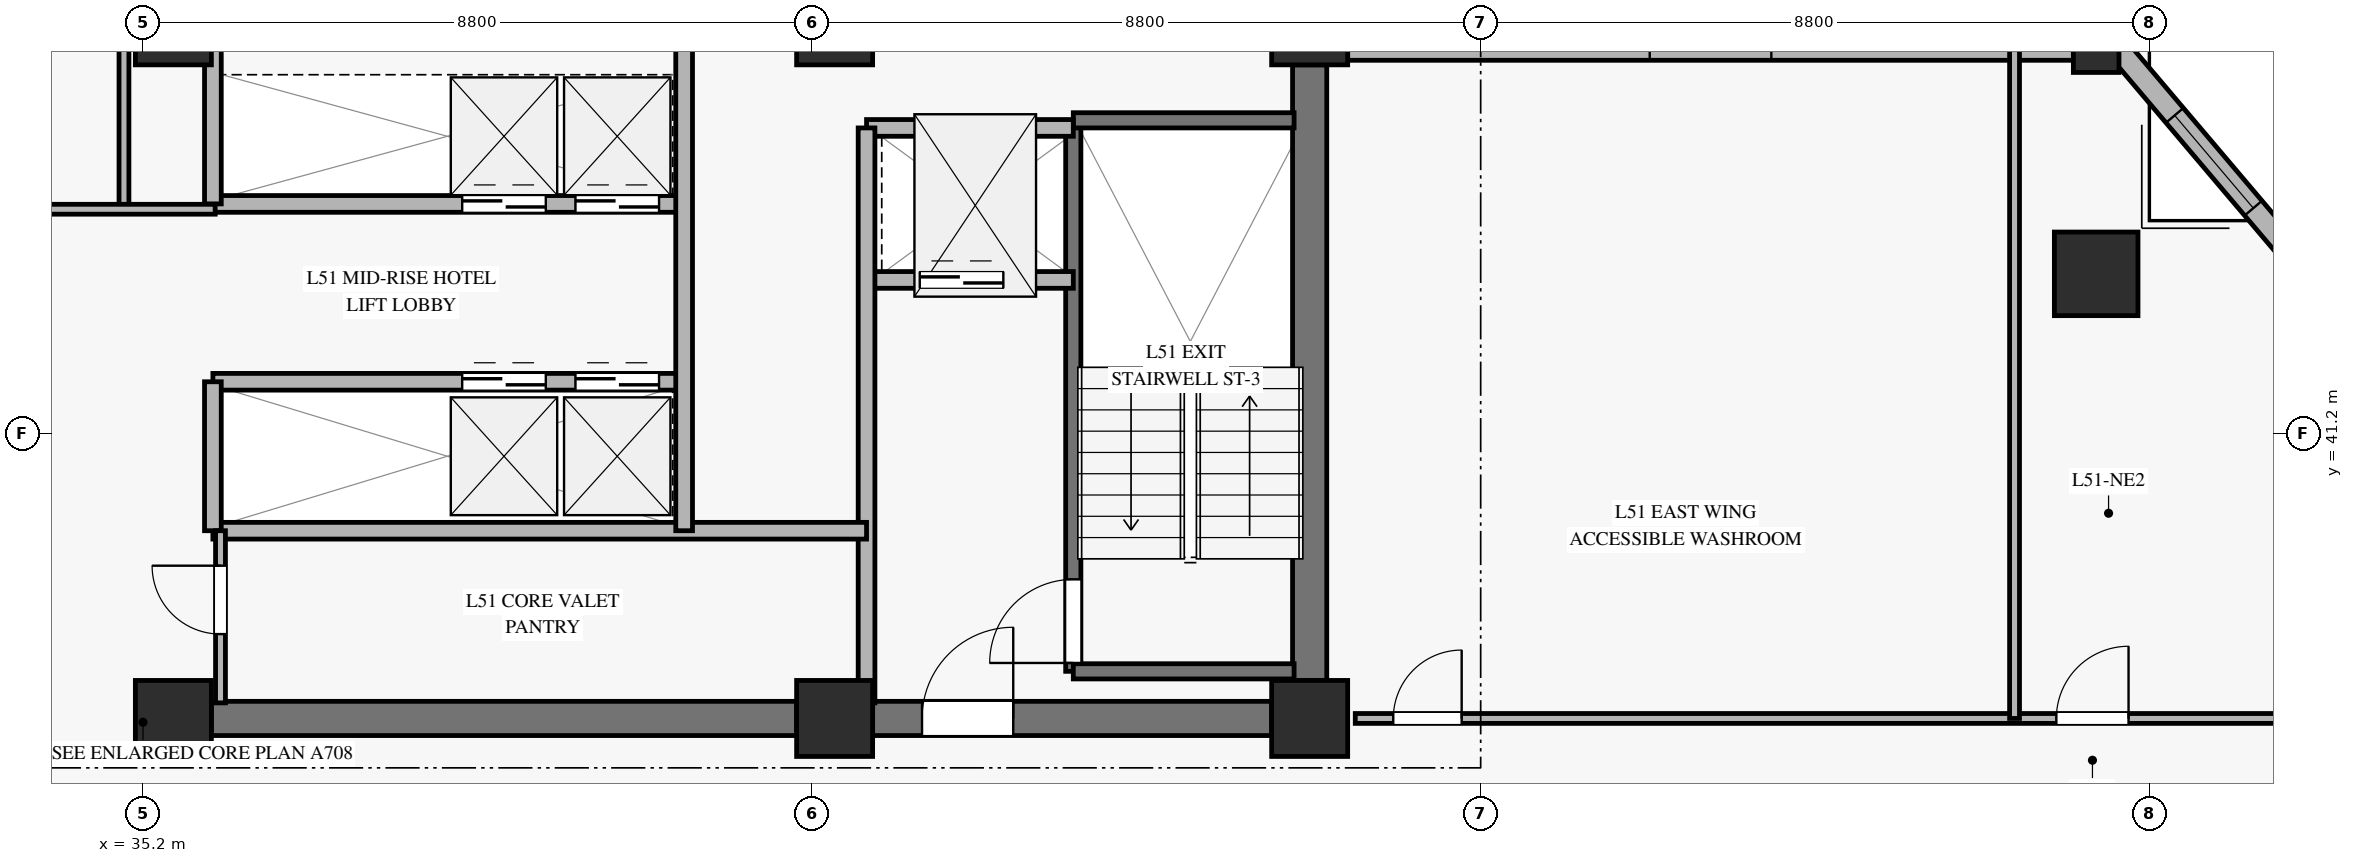
"""IFC4 building model, lengths in metres.
Left out: names, types, materials, properties, quantities, classifications, styles, units other than length and angle.
Written with IfcOpenShell. Run it as: python <this file> out.ifc"""

import sys

from ifc_helpers import new_model, si_unit, direction, frame, frame_2d, origin, origin_2d, place, context, subcontext, project, spatial, rectangle, hollow_rectangle, extrude, source, transform, mapped, element, fill, save


model = new_model("IFC4")
c1 = context("Model", 3, precision=1e-05, world=origin(), true_north=direction((0.0, 1.0)))
c2 = subcontext(c1, "Body", "Model", "MODEL_VIEW")
j1 = project(units=[si_unit("LENGTHUNIT", "METRE"), si_unit("PLANEANGLEUNIT", "RADIAN")], contexts=[c1])
p1 = place(None, origin())
s1 = spatial("IfcSite", under=j1, at=p1, CompositionType="ELEMENT")
p2 = place(p1, origin())
s2 = spatial("IfcBuilding", under=s1, at=p2, CompositionType="ELEMENT")
p3 = place(p2, frame((0.0, 0.0, 202.7)))
s3 = spatial("IfcBuildingStorey", under=s2, at=p3, CompositionType="ELEMENT", Elevation=202.7)
m1 = source(origin(), c2, "Body", "SweptSolid", [
    extrude(rectangle(XDim=1.0, YDim=1.0, at=origin_2d()), origin(), (0.0, 0.0, 1.0), 3.27),
])
for number, where, z_axis, x_axis in (
    (1, (35.6, 37.45, 0.0), (0.0, 0.0, 1.0), (1.0, 0.0, 0.0)),
    (2, (35.6, 46.55, 0.0), (0.0, 0.0, 1.0), (1.0, 0.0, 0.0)),
    (3, (44.3, 37.45, 0.0), (0.0, 0.0, 1.0), (1.0, 0.0, 0.0)),
    (4, (44.3, 46.55, 0.0), (0.0, 0.0, 1.0), (1.0, 0.0, 0.0)),
    (5, (50.55, 37.45, 0.0), (0.0, 0.0, 1.0), (1.0, 0.0, 0.0)),
    (6, (50.55, 46.55, 0.0), (0.0, 0.0, 1.0), (1.0, 0.0, 0.0)),
):
    element("IfcColumn", number, at=place(p3, frame(where, z_axis=z_axis, x_axis=x_axis)), inside=s3, PredefinedType="PILASTER", context=c2, shape_type="MappedRepresentation", body=[
        mapped(m1, transform((0.0, 0.0, 0.0), x_axis=(1.0, 0.0, 0.0), y_axis=(0.0, 1.0, 0.0), z_axis=(0.0, 0.0, 1.0), scale=1.0)),
    ])
p4 = place(p3, frame((36.1, 37.45, 0.0), z_axis=(0.0, 0.0, 1.0), x_axis=(1.0, 0.0, 0.0)))
e7 = element("IfcWall", 7, at=p4, inside=s3, PredefinedType="SHEAR", context=c2, shape_type="SweptSolid", body=[
    extrude(rectangle(XDim=7.7, YDim=0.45, at=frame_2d((3.85, 0.0))), origin(), (0.0, 0.0, 1.0), 3.27),
])
p5 = place(p3, frame((44.8, 37.45, 0.0), z_axis=(0.0, 0.0, 1.0), x_axis=(1.0, 0.0, 0.0)))
e8 = element("IfcWall", 8, at=p5, inside=s3, PredefinedType="SHEAR", context=c2, shape_type="SweptSolid", body=[
    extrude(rectangle(XDim=5.25, YDim=0.45, at=frame_2d((2.625, 0.0))), origin(), (0.0, 0.0, 1.0), 3.27),
])
p6 = place(p5, frame((0.65, 0.0, 0.0)))
e9 = element("IfcOpeningElement", 9, at=p6, cuts=e8, PredefinedType="OPENING", context=c2, shape_type="SweptSolid", body=[
    extrude(rectangle(XDim=1.2, YDim=2.15, at=frame_2d((0.6, 1.075))), frame((0.0, 0.235, 0.0), z_axis=(0.0, -1.0, 0.0), x_axis=(1.0, 0.0, 0.0)), (0.0, 0.0, 1.0), 0.47),
])
p7 = place(p3, frame((50.55, 37.95, 0.0), z_axis=(0.0, 0.0, 1.0), x_axis=(0.0, 1.0, 0.0)))
e10 = element("IfcWall", 10, at=p7, inside=s3, PredefinedType="SHEAR", context=c2, shape_type="SweptSolid", body=[
    extrude(rectangle(XDim=8.1, YDim=0.45, at=frame_2d((4.05, 0.0))), origin(), (0.0, 0.0, 1.0), 3.27),
])
m2 = source(origin(), c2, "Body", "SweptSolid", [
    extrude(hollow_rectangle(XDim=1.1, YDim=1.1, WallThickness=0.05, at=origin_2d()), origin(), (0.0, 0.0, 1.0), 3.27),
])
p8 = place(p3, frame((60.898, 43.3, 0.0), z_axis=(0.0, 0.0, 1.0), x_axis=(1.0, 0.0, 0.0)))
e11 = element("IfcColumn", 11, at=p8, inside=s3, PredefinedType="COLUMN", context=c2, shape_type="MappedRepresentation", body=[
    mapped(m2, transform((0.0, 0.0, 0.0), x_axis=(1.0, 0.0, 0.0), y_axis=(0.0, 1.0, 0.0), z_axis=(0.0, 0.0, 1.0), scale=1.0)),
])
m3 = source(origin(), c2, "Body", "SweptSolid", [
    extrude(hollow_rectangle(XDim=0.6, YDim=0.6, WallThickness=0.028, at=origin_2d()), origin(), (0.0, 0.0, 1.0), 3.27),
])
p9 = place(p3, frame((60.898, 46.25, 0.0), z_axis=(0.0, 0.0, 1.0), x_axis=(1.0, 0.0, 0.0)))
e12 = element("IfcColumn", 12, at=p9, inside=s3, PredefinedType="COLUMN", context=c2, shape_type="MappedRepresentation", body=[
    mapped(m3, transform((0.0, 0.0, 0.0), x_axis=(1.0, 0.0, 0.0), y_axis=(0.0, 1.0, 0.0), z_axis=(0.0, 0.0, 1.0), scale=1.0)),
])
p10 = place(p3, frame((51.05, 46.25, 0.0), z_axis=(0.0, 0.0, 1.0), x_axis=(1.0, 0.0, 0.0)))
e13 = element("IfcWall", 13, at=p10, inside=s3, PredefinedType="SOLIDWALL", context=c2, shape_type="SweptSolid", body=[
    extrude(rectangle(XDim=9.548, YDim=0.28, at=frame_2d((4.774, 0.0))), origin(), (0.0, 0.0, 1.0), 2.75),
])
p11 = place(p10, frame((3.974, 0.0, 0.45)))
e14 = element("IfcOpeningElement", 14, at=p11, cuts=e13, PredefinedType="OPENING", context=c2, shape_type="SweptSolid", body=[
    extrude(rectangle(XDim=1.6, YDim=2.0, at=frame_2d((0.8, 1.0))), frame((0.0, 0.15, 0.0), z_axis=(0.0, -1.0, 0.0), x_axis=(1.0, 0.0, 0.0)), (0.0, 0.0, 1.0), 0.3),
])
p12 = place(p3, frame((63.698, 43.3, 0.0), z_axis=(0.0, 0.0, 1.0), x_axis=(-0.646527923623, 0.762890322377, 0.0)))
e15 = element("IfcWall", 15, at=p12, inside=s3, PredefinedType="SOLIDWALL", context=c2, shape_type="SweptSolid", body=[
    extrude(rectangle(XDim=3.867, YDim=0.3, at=frame_2d((1.933, 0.0))), origin(), (0.0, 0.0, 1.0), 2.75),
])
p13 = place(p12, frame((1.133, 0.0, 0.45)))
e16 = element("IfcOpeningElement", 16, at=p13, cuts=e15, PredefinedType="OPENING", context=c2, shape_type="SweptSolid", body=[
    extrude(rectangle(XDim=1.6, YDim=2.0, at=frame_2d((0.8, 1.0))), frame((0.0, 0.16, 0.0), z_axis=(0.0, -1.0, 0.0), x_axis=(1.0, 0.0, 0.0)), (0.0, 0.0, 1.0), 0.32),
])
p14 = place(p3, frame((47.44, 38.07, 0.0), z_axis=(0.0, 0.0, 1.0), x_axis=(0.0, 1.0, 0.0)))
e17 = element("IfcWall", 17, at=p14, inside=s3, PredefinedType="SOLIDWALL", context=c2, shape_type="SweptSolid", body=[
    extrude(rectangle(XDim=7.25, YDim=0.2, at=frame_2d((3.625, 0.0))), origin(), (0.0, 0.0, 1.0), 3.5),
])
p15 = place(p14, frame((0.11, 0.0, 0.0)))
e18 = element("IfcOpeningElement", 18, at=p15, cuts=e17, PredefinedType="OPENING", context=c2, shape_type="SweptSolid", body=[
    extrude(rectangle(XDim=1.1, YDim=2.15, at=frame_2d((0.55, 1.075))), frame((0.0, 0.11, 0.0), z_axis=(0.0, -1.0, 0.0), x_axis=(1.0, 0.0, 0.0)), (0.0, 0.0, 1.0), 0.22),
])
for number, where, z_axis, x_axis in (
    (19, (47.44, 45.32, 0.0), (0.0, 0.0, 1.0), (1.0, 0.0, 0.0)),
    (20, (47.44, 38.07, 0.0), (0.0, 0.0, 1.0), (1.0, 0.0, 0.0)),
):
    element("IfcWall", number, at=place(p3, frame(where, z_axis=z_axis, x_axis=x_axis)), inside=s3, PredefinedType="SOLIDWALL", context=c2, shape_type="SweptSolid", body=[
        extrude(rectangle(XDim=2.905, YDim=0.2, at=frame_2d((1.453, 0.0))), origin(), (0.0, 0.0, 1.0), 3.5),
    ])
p16 = place(p3, frame((44.72, 43.22, 0.0), z_axis=(0.0, 0.0, 1.0), x_axis=(1.0, 0.0, 0.0)))
e21 = element("IfcWall", 21, at=p16, inside=s3, PredefinedType="SOLIDWALL", context=c2, shape_type="SweptSolid", body=[
    extrude(rectangle(XDim=2.72, YDim=0.22, at=frame_2d((1.36, 0.0))), origin(), (0.0, 0.0, 1.0), 3.27),
])
p17 = place(p16, frame((0.7, 0.0, 0.0)))
e22 = element("IfcOpeningElement", 22, at=p17, cuts=e21, PredefinedType="OPENING", context=c2, shape_type="SweptSolid", body=[
    extrude(rectangle(XDim=1.1, YDim=2.2, at=frame_2d((0.55, 1.1))), frame((0.0, 0.12, 0.0), z_axis=(0.0, -1.0, 0.0), x_axis=(1.0, 0.0, 0.0)), (0.0, 0.0, 1.0), 0.24),
])
p18 = place(p3, frame((44.72, 45.22, 0.0), z_axis=(0.0, 0.0, 1.0), x_axis=(1.0, 0.0, 0.0)))
e23 = element("IfcWall", 23, at=p18, inside=s3, PredefinedType="SOLIDWALL", context=c2, shape_type="SweptSolid", body=[
    extrude(rectangle(XDim=2.72, YDim=0.22, at=frame_2d((1.36, 0.0))), origin(), (0.0, 0.0, 1.0), 3.27),
])
p19 = place(p3, frame((44.72, 37.655, 0.0), z_axis=(0.0, 0.0, 1.0), x_axis=(0.0, 1.0, 0.0)))
e24 = element("IfcWall", 24, at=p19, inside=s3, PredefinedType="SOLIDWALL", context=c2, shape_type="SweptSolid", body=[
    extrude(rectangle(XDim=7.565, YDim=0.22, at=frame_2d((3.782, 0.0))), origin(), (0.0, 0.0, 1.0), 3.27),
])
p20 = place(p3, frame((36.12, 44.22, 0.0), z_axis=(0.0, 0.0, 1.0), x_axis=(1.0, 0.0, 0.0)))
e25 = element("IfcWall", 25, at=p20, inside=s3, PredefinedType="SOLIDWALL", context=c2, shape_type="SweptSolid", body=[
    extrude(rectangle(XDim=6.2, YDim=0.22, at=frame_2d((3.1, 0.0))), origin(), (0.0, 0.0, 1.0), 3.27),
])
p21 = place(p20, frame((3.28, 0.0, 0.0)))
e26 = element("IfcOpeningElement", 26, at=p21, cuts=e25, PredefinedType="OPENING", context=c2, shape_type="SweptSolid", body=[
    extrude(rectangle(XDim=1.1, YDim=2.2, at=frame_2d((0.55, 1.1))), frame((0.0, 0.12, 0.0), z_axis=(0.0, -1.0, 0.0), x_axis=(1.0, 0.0, 0.0)), (0.0, 0.0, 1.0), 0.24),
])
p22 = place(p20, frame((4.77, 0.0, 0.0)))
e27 = element("IfcOpeningElement", 27, at=p22, cuts=e25, PredefinedType="OPENING", context=c2, shape_type="SweptSolid", body=[
    extrude(rectangle(XDim=1.1, YDim=2.2, at=frame_2d((0.55, 1.1))), frame((0.0, 0.12, 0.0), z_axis=(0.0, -1.0, 0.0), x_axis=(1.0, 0.0, 0.0)), (0.0, 0.0, 1.0), 0.24),
])
p23 = place(p3, frame((36.12, 41.88, 0.0), z_axis=(0.0, 0.0, 1.0), x_axis=(1.0, 0.0, 0.0)))
e28 = element("IfcWall", 28, at=p23, inside=s3, PredefinedType="SOLIDWALL", context=c2, shape_type="SweptSolid", body=[
    extrude(rectangle(XDim=6.2, YDim=0.22, at=frame_2d((3.1, 0.0))), origin(), (0.0, 0.0, 1.0), 3.27),
])
p24 = place(p23, frame((3.28, 0.0, 0.0)))
e29 = element("IfcOpeningElement", 29, at=p24, cuts=e28, PredefinedType="OPENING", context=c2, shape_type="SweptSolid", body=[
    extrude(rectangle(XDim=1.1, YDim=2.2, at=frame_2d((0.55, 1.1))), frame((0.0, 0.12, 0.0), z_axis=(0.0, -1.0, 0.0), x_axis=(1.0, 0.0, 0.0)), (0.0, 0.0, 1.0), 0.24),
])
p25 = place(p23, frame((4.77, 0.0, 0.0)))
e30 = element("IfcOpeningElement", 30, at=p25, cuts=e28, PredefinedType="OPENING", context=c2, shape_type="SweptSolid", body=[
    extrude(rectangle(XDim=1.1, YDim=2.2, at=frame_2d((0.55, 1.1))), frame((0.0, 0.12, 0.0), z_axis=(0.0, -1.0, 0.0), x_axis=(1.0, 0.0, 0.0)), (0.0, 0.0, 1.0), 0.24),
])
p26 = place(p3, frame((36.12, 39.92, 0.0), z_axis=(0.0, 0.0, 1.0), x_axis=(1.0, 0.0, 0.0)))
e31 = element("IfcWall", 31, at=p26, inside=s3, PredefinedType="SOLIDWALL", context=c2, shape_type="SweptSolid", body=[
    extrude(rectangle(XDim=8.6, YDim=0.22, at=frame_2d((4.3, 0.0))), origin(), (0.0, 0.0, 1.0), 2.555),
])
p27 = place(p3, frame((42.32, 39.92, 0.0), z_axis=(0.0, 0.0, 1.0), x_axis=(0.0, 1.0, 0.0)))
e32 = element("IfcWall", 32, at=p27, inside=s3, PredefinedType="SOLIDWALL", context=c2, shape_type="SweptSolid", body=[
    extrude(rectangle(XDim=6.425, YDim=0.22, at=frame_2d((3.212, 0.0))), origin(), (0.0, 0.0, 1.0), 3.27),
])
p28 = place(p3, frame((36.12, 39.92, 0.0), z_axis=(0.0, 0.0, 1.0), x_axis=(0.0, 1.0, 0.0)))
e33 = element("IfcWall", 33, at=p28, inside=s3, PredefinedType="SOLIDWALL", context=c2, shape_type="SweptSolid", body=[
    extrude(rectangle(XDim=1.96, YDim=0.22, at=frame_2d((0.98, 0.0))), origin(), (0.0, 0.0, 1.0), 3.27),
])
p29 = place(p3, frame((36.12, 44.22, 0.0), z_axis=(0.0, 0.0, 1.0), x_axis=(0.0, 1.0, 0.0)))
e34 = element("IfcWall", 34, at=p29, inside=s3, PredefinedType="SOLIDWALL", context=c2, shape_type="SweptSolid", body=[
    extrude(rectangle(XDim=2.125, YDim=0.22, at=frame_2d((1.062, 0.0))), origin(), (0.0, 0.0, 1.0), 3.27),
])
p30 = place(p3, frame((34.95, 44.15, 0.0), z_axis=(0.0, 0.0, 1.0), x_axis=(0.0, 1.0, 0.0)))
e35 = element("IfcWall", 35, at=p30, inside=s3, PredefinedType="PARTITIONING", context=c2, shape_type="SweptSolid", body=[
    extrude(rectangle(XDim=2.195, YDim=0.13, at=frame_2d((1.098, 0.0))), origin(), (0.0, 0.0, 1.0), 3.27),
])
p31 = place(p3, frame((33.18, 44.15, 0.0), z_axis=(0.0, 0.0, 1.0), x_axis=(1.0, 0.0, 0.0)))
e36 = element("IfcWall", 36, at=p31, inside=s3, PredefinedType="PARTITIONING", context=c2, shape_type="SweptSolid", body=[
    extrude(rectangle(XDim=2.97, YDim=0.13, at=frame_2d((1.485, 0.0))), origin(), (0.0, 0.0, 1.0), 2.555),
])
p32 = place(p3, frame((36.22, 37.655, 0.0), z_axis=(0.0, 0.0, 1.0), x_axis=(0.0, 1.0, 0.0)))
e37 = element("IfcWall", 37, at=p32, inside=s3, PredefinedType="PARTITIONING", context=c2, shape_type="SweptSolid", body=[
    extrude(rectangle(XDim=2.265, YDim=0.13, at=frame_2d((1.132, 0.0))), origin(), (0.0, 0.0, 1.0), 3.27),
])
p33 = place(p32, frame((0.905, 0.0, 0.0)))
e38 = element("IfcOpeningElement", 38, at=p33, cuts=e37, PredefinedType="OPENING", context=c2, shape_type="SweptSolid", body=[
    extrude(rectangle(XDim=0.9, YDim=2.1, at=frame_2d((0.45, 1.05))), frame((0.0, 0.075, 0.0), z_axis=(0.0, -1.0, 0.0), x_axis=(1.0, 0.0, 0.0)), (0.0, 0.0, 1.0), 0.15),
])
p34 = place(p3, frame((51.15, 37.45, 0.0), z_axis=(0.0, 0.0, 1.0), x_axis=(1.0, 0.0, 0.0)))
e39 = element("IfcWall", 39, at=p34, inside=s3, PredefinedType="PARTITIONING", context=c2, shape_type="SweptSolid", body=[
    extrude(rectangle(XDim=12.548, YDim=0.13, at=frame_2d((6.274, 0.0))), origin(), (0.0, 0.0, 1.0), 2.755),
])
p35 = place(p34, frame((0.5, 0.0, 0.0)))
e40 = element("IfcOpeningElement", 40, at=p35, cuts=e39, PredefinedType="OPENING", context=c2, shape_type="SweptSolid", body=[
    extrude(rectangle(XDim=0.9, YDim=2.1, at=frame_2d((0.45, 1.05))), frame((0.0, 0.075, 0.0), z_axis=(0.0, -1.0, 0.0), x_axis=(1.0, 0.0, 0.0)), (0.0, 0.0, 1.0), 0.15),
])
p36 = place(p34, frame((9.224, 0.0, 0.0)))
e41 = element("IfcOpeningElement", 41, at=p36, cuts=e39, PredefinedType="OPENING", context=c2, shape_type="SweptSolid", body=[
    extrude(rectangle(XDim=0.95, YDim=2.1, at=frame_2d((0.475, 1.05))), frame((0.0, 0.075, 0.0), z_axis=(0.0, -1.0, 0.0), x_axis=(1.0, 0.0, 0.0)), (0.0, 0.0, 1.0), 0.15),
])
p37 = place(p3, frame((59.824, 37.45, 0.0), z_axis=(0.0, 0.0, 1.0), x_axis=(0.0, 1.0, 0.0)))
e42 = element("IfcWall", 42, at=p37, inside=s3, PredefinedType="PARTITIONING", context=c2, shape_type="SweptSolid", body=[
    extrude(rectangle(XDim=8.8, YDim=0.13, at=frame_2d((4.4, 0.0))), origin(), (0.0, 0.0, 1.0), 2.755),
])
m4 = source(origin(), c2, "Body", "SweptSolid", [
    extrude(rectangle(XDim=1.6, YDim=2.0, at=frame_2d((0.8, 1.0))), frame((0.0, 0.03, 0.0), z_axis=(0.0, -1.0, 0.0), x_axis=(1.0, 0.0, 0.0)), (0.0, 0.0, 1.0), 0.06),
])
p38 = place(p13, origin())
e43 = element("IfcWindow", 43, at=p38, inside=s3, PartitioningType="SINGLE_PANEL", PredefinedType="WINDOW", context=c2, shape_type="MappedRepresentation", body=[
    mapped(m4, transform((0.0, 0.0, 0.0), x_axis=(1.0, 0.0, 0.0), y_axis=(0.0, 1.0, 0.0), z_axis=(0.0, 0.0, 1.0), scale=1.0)),
])
fill(e16, e43)
m5 = source(origin(), c2, "Body", "SweptSolid", [
    extrude(rectangle(XDim=1.1, YDim=2.15, at=frame_2d((0.55, 1.075))), frame((0.0, 0.025, 0.0), z_axis=(0.0, -1.0, 0.0), x_axis=(1.0, 0.0, 0.0)), (0.0, 0.0, 1.0), 0.05),
])
p39 = place(p15, origin())
e44 = element("IfcDoor", 44, at=p39, inside=s3, OperationType="SINGLE_SWING_LEFT", PredefinedType="DOOR", context=c2, shape_type="MappedRepresentation", body=[
    mapped(m5, transform((0.0, 0.0, 0.0), x_axis=(1.0, 0.0, 0.0), y_axis=(0.0, 1.0, 0.0), z_axis=(0.0, 0.0, 1.0), scale=1.0)),
])
fill(e18, e44)
m6 = source(origin(), c2, "Body", "SweptSolid", [
    extrude(rectangle(XDim=1.1, YDim=2.2, at=frame_2d((0.55, 1.1))), frame((0.0, 0.025, 0.0), z_axis=(0.0, -1.0, 0.0), x_axis=(1.0, 0.0, 0.0)), (0.0, 0.0, 1.0), 0.05),
])
p40 = place(p17, origin())
e45 = element("IfcDoor", 45, at=p40, inside=s3, OperationType="SLIDING_TO_LEFT", PredefinedType="DOOR", context=c2, shape_type="MappedRepresentation", body=[
    mapped(m6, transform((0.0, 0.0, 0.0), x_axis=(1.0, 0.0, 0.0), y_axis=(0.0, 1.0, 0.0), z_axis=(0.0, 0.0, 1.0), scale=1.0)),
])
fill(e22, e45)
m7 = source(origin(), c2, "Body", "SweptSolid", [
    extrude(rectangle(XDim=1.2, YDim=2.15, at=frame_2d((0.6, 1.075))), frame((0.0, 0.025, 0.0), z_axis=(0.0, -1.0, 0.0), x_axis=(1.0, 0.0, 0.0)), (0.0, 0.0, 1.0), 0.05),
])
p41 = place(p6, origin())
e46 = element("IfcDoor", 46, at=p41, inside=s3, OperationType="SINGLE_SWING_RIGHT", PredefinedType="DOOR", context=c2, shape_type="MappedRepresentation", body=[
    mapped(m7, transform((0.0, 0.0, 0.0), x_axis=(1.0, 0.0, 0.0), y_axis=(0.0, 1.0, 0.0), z_axis=(0.0, 0.0, 1.0), scale=1.0)),
])
fill(e9, e46)
p42 = place(p21, origin())
e47 = element("IfcDoor", 47, at=p42, inside=s3, OperationType="SLIDING_TO_LEFT", PredefinedType="DOOR", context=c2, shape_type="MappedRepresentation", body=[
    mapped(m6, transform((0.0, 0.0, 0.0), x_axis=(1.0, 0.0, 0.0), y_axis=(0.0, 1.0, 0.0), z_axis=(0.0, 0.0, 1.0), scale=1.0)),
])
fill(e26, e47)
p43 = place(p22, origin())
e48 = element("IfcDoor", 48, at=p43, inside=s3, OperationType="SLIDING_TO_LEFT", PredefinedType="DOOR", context=c2, shape_type="MappedRepresentation", body=[
    mapped(m6, transform((0.0, 0.0, 0.0), x_axis=(1.0, 0.0, 0.0), y_axis=(0.0, 1.0, 0.0), z_axis=(0.0, 0.0, 1.0), scale=1.0)),
])
fill(e27, e48)
p44 = place(p24, origin())
e49 = element("IfcDoor", 49, at=p44, inside=s3, OperationType="SLIDING_TO_LEFT", PredefinedType="DOOR", context=c2, shape_type="MappedRepresentation", body=[
    mapped(m6, transform((0.0, 0.0, 0.0), x_axis=(1.0, 0.0, 0.0), y_axis=(0.0, 1.0, 0.0), z_axis=(0.0, 0.0, 1.0), scale=1.0)),
])
fill(e29, e49)
p45 = place(p25, origin())
e50 = element("IfcDoor", 50, at=p45, inside=s3, OperationType="SLIDING_TO_LEFT", PredefinedType="DOOR", context=c2, shape_type="MappedRepresentation", body=[
    mapped(m6, transform((0.0, 0.0, 0.0), x_axis=(1.0, 0.0, 0.0), y_axis=(0.0, 1.0, 0.0), z_axis=(0.0, 0.0, 1.0), scale=1.0)),
])
fill(e30, e50)
m8 = source(origin(), c2, "Body", "SweptSolid", [
    extrude(rectangle(XDim=0.9, YDim=2.1, at=frame_2d((0.45, 1.05))), frame((0.0, 0.025, 0.0), z_axis=(0.0, -1.0, 0.0), x_axis=(1.0, 0.0, 0.0)), (0.0, 0.0, 1.0), 0.05),
])
p46 = place(p33, origin())
e51 = element("IfcDoor", 51, at=p46, inside=s3, OperationType="SINGLE_SWING_RIGHT", PredefinedType="DOOR", context=c2, shape_type="MappedRepresentation", body=[
    mapped(m8, transform((0.0, 0.0, 0.0), x_axis=(1.0, 0.0, 0.0), y_axis=(0.0, 1.0, 0.0), z_axis=(0.0, 0.0, 1.0), scale=1.0)),
])
fill(e38, e51)
p47 = place(p35, origin())
e52 = element("IfcDoor", 52, at=p47, inside=s3, OperationType="SINGLE_SWING_RIGHT", PredefinedType="DOOR", context=c2, shape_type="MappedRepresentation", body=[
    mapped(m8, transform((0.0, 0.0, 0.0), x_axis=(1.0, 0.0, 0.0), y_axis=(0.0, 1.0, 0.0), z_axis=(0.0, 0.0, 1.0), scale=1.0)),
])
fill(e40, e52)
m9 = source(origin(), c2, "Body", "SweptSolid", [
    extrude(rectangle(XDim=0.95, YDim=2.1, at=frame_2d((0.475, 1.05))), frame((0.0, 0.025, 0.0), z_axis=(0.0, -1.0, 0.0), x_axis=(1.0, 0.0, 0.0)), (0.0, 0.0, 1.0), 0.05),
])
p48 = place(p36, origin())
e53 = element("IfcDoor", 53, at=p48, inside=s3, OperationType="SINGLE_SWING_RIGHT", PredefinedType="DOOR", context=c2, shape_type="MappedRepresentation", body=[
    mapped(m9, transform((0.0, 0.0, 0.0), x_axis=(1.0, 0.0, 0.0), y_axis=(0.0, 1.0, 0.0), z_axis=(0.0, 0.0, 1.0), scale=1.0)),
])
fill(e41, e53)
save(model, sys.argv[1])
